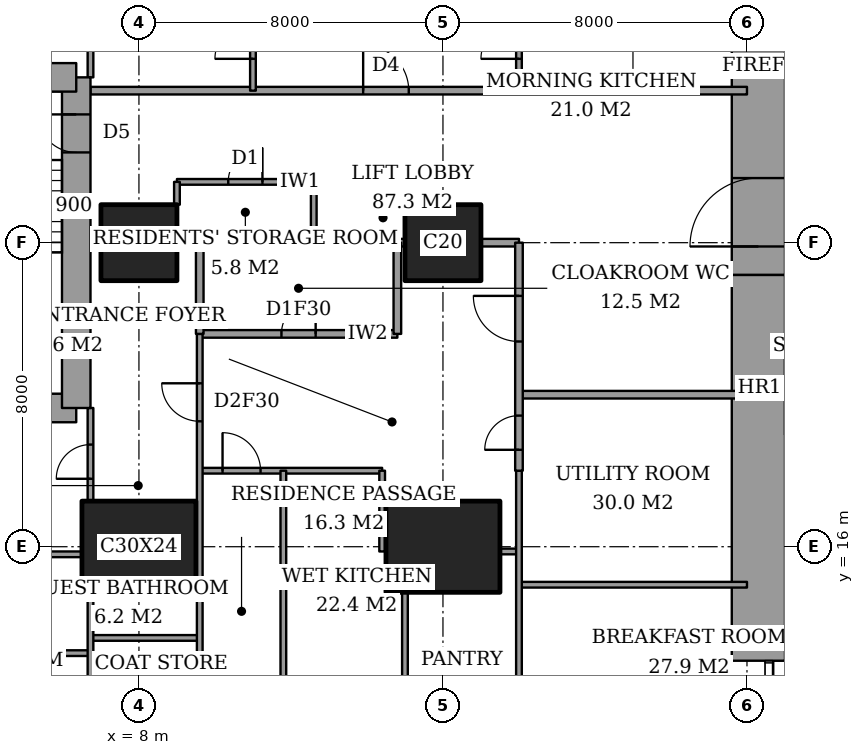
"""IFC4 building model, lengths in metres.
Left out: names, types, materials, properties, quantities, classifications, styles, units other than length and angle.
Written with IfcOpenShell. Run it as: python <this file> out.ifc"""

import sys

from ifc_helpers import new_model, si_unit, direction, frame, frame_2d, origin, origin_2d, place, context, subcontext, project, spatial, rectangle, extrude, element, fill, save


model = new_model("IFC4")
c1 = context("Model", 3, precision=1e-05, world=origin(), true_north=direction((0.0, 1.0)))
c2 = subcontext(c1, "Body", "Model", "MODEL_VIEW")
j1 = project(units=[si_unit("LENGTHUNIT", "METRE"), si_unit("PLANEANGLEUNIT", "RADIAN")], contexts=[c1])
p1 = place(None, origin())
s1 = spatial("IfcSite", under=j1, at=p1, CompositionType="ELEMENT")
p2 = place(p1, origin())
s2 = spatial("IfcBuilding", under=s1, at=p2, CompositionType="ELEMENT")
p3 = place(p2, frame((0.0, 0.0, 110.6)))
s3 = spatial("IfcBuildingStorey", under=s2, at=p3, CompositionType="ELEMENT", Elevation=110.6)
p4 = place(p3, frame((8.0, 16.0, 0.0), z_axis=(0.0, 0.0, 1.0), x_axis=(1.0, 0.0, 0.0)))
e1 = element("IfcColumn", 1, at=p4, inside=s3, PredefinedType="COLUMN", context=c2, shape_type="SweptSolid", body=[
    extrude(rectangle(XDim=3.0, YDim=2.4, at=origin_2d()), origin(), (0.0, 0.0, 1.0), 3.6),
])
p5 = place(p3, frame((8.0, 24.0, 0.0), z_axis=(0.0, 0.0, 1.0), x_axis=(1.0, 0.0, 0.0)))
e2 = element("IfcColumn", 2, at=p5, inside=s3, PredefinedType="COLUMN", context=c2, shape_type="SweptSolid", body=[
    extrude(rectangle(XDim=2.0, YDim=2.0, at=origin_2d()), origin(), (0.0, 0.0, 1.0), 3.6),
])
p6 = place(p3, frame((16.0, 16.0, 0.0), z_axis=(0.0, 0.0, 1.0), x_axis=(1.0, 0.0, 0.0)))
e3 = element("IfcColumn", 3, at=p6, inside=s3, PredefinedType="COLUMN", context=c2, shape_type="SweptSolid", body=[
    extrude(rectangle(XDim=3.0, YDim=2.4, at=origin_2d()), origin(), (0.0, 0.0, 1.0), 3.6),
])
p7 = place(p3, frame((16.0, 24.0, 0.0), z_axis=(0.0, 0.0, 1.0), x_axis=(1.0, 0.0, 0.0)))
e4 = element("IfcColumn", 4, at=p7, inside=s3, PredefinedType="COLUMN", context=c2, shape_type="SweptSolid", body=[
    extrude(rectangle(XDim=2.0, YDim=2.0, at=origin_2d()), origin(), (0.0, 0.0, 1.0), 3.6),
])
p8 = place(p3, frame((24.3, 13.0, 0.0), z_axis=(0.0, 0.0, 1.0), x_axis=(0.0, 1.0, 0.0)))
e5 = element("IfcWall", 5, at=p8, inside=s3, PredefinedType="SHEAR", context=c2, shape_type="SweptSolid", body=[
    extrude(rectangle(XDim=10.15, YDim=1.4, at=frame_2d((5.075, 0.0))), origin(), (0.0, 0.0, 1.0), 3.6),
])
p9 = place(p3, frame((24.3, 23.15, 0.0), z_axis=(0.0, 0.0, 1.0), x_axis=(0.0, 1.0, 0.0)))
e6 = element("IfcWall", 6, at=p9, inside=s3, PredefinedType="SHEAR", context=c2, shape_type="SweptSolid", body=[
    extrude(rectangle(XDim=11.85, YDim=1.4, at=frame_2d((5.925, 0.0))), origin(), (0.0, 0.0, 1.0), 3.6),
])
p10 = place(p9, frame((0.75, 0.0, 0.0)))
e7 = element("IfcOpeningElement", 7, at=p10, cuts=e6, PredefinedType="OPENING", context=c2, shape_type="SweptSolid", body=[
    extrude(rectangle(XDim=1.8, YDim=2.4, at=frame_2d((0.9, 1.2))), frame((0.0, 0.71, 0.0), z_axis=(0.0, -1.0, 0.0), x_axis=(1.0, 0.0, 0.0)), (0.0, 0.0, 1.0), 1.42),
])
p11 = place(p3, frame((1.9, 19.65, 0.0), z_axis=(0.0, 0.0, 1.0), x_axis=(1.0, 0.0, 0.0)))
e8 = element("IfcWall", 8, at=p11, inside=s3, PredefinedType="SHEAR", context=c2, shape_type="SweptSolid", body=[
    extrude(rectangle(XDim=4.45, YDim=0.75, at=frame_2d((2.225, 0.0))), origin(), (0.0, 0.0, 1.0), 3.6),
])
p12 = place(p3, frame((6.35, 19.65, 0.0), z_axis=(0.0, 0.0, 1.0), x_axis=(0.0, 1.0, 0.0)))
e9 = element("IfcWall", 9, at=p12, inside=s3, PredefinedType="SHEAR", context=c2, shape_type="SweptSolid", body=[
    extrude(rectangle(XDim=8.7, YDim=0.75, at=frame_2d((4.35, 0.0))), origin(), (0.0, 0.0, 1.0), 3.6),
])
p13 = place(p12, frame((6.725, 0.0, 0.0)))
e10 = element("IfcOpeningElement", 10, at=p13, cuts=e9, PredefinedType="OPENING", context=c2, shape_type="SweptSolid", body=[
    extrude(rectangle(XDim=1.0, YDim=2.1, at=frame_2d((0.5, 1.05))), frame((0.0, 0.385, 0.0), z_axis=(0.0, -1.0, 0.0), x_axis=(1.0, 0.0, 0.0)), (0.0, 0.0, 1.0), 0.77),
])
p14 = place(p3, frame((6.35, 28.35, 0.0), z_axis=(0.0, 0.0, 1.0), x_axis=(-1.0, 0.0, 0.0)))
e11 = element("IfcWall", 11, at=p14, inside=s3, PredefinedType="SHEAR", context=c2, shape_type="SweptSolid", body=[
    extrude(rectangle(XDim=4.45, YDim=0.75, at=frame_2d((2.225, 0.0))), origin(), (0.0, 0.0, 1.0), 3.6),
])
p15 = place(p3, frame((4.325, 13.2, 0.0), z_axis=(0.0, 0.0, 1.0), x_axis=(1.0, 0.0, 0.0)))
e12 = element("IfcWall", 12, at=p15, inside=s3, PredefinedType="PARTITIONING", context=c2, shape_type="SweptSolid", body=[
    extrude(rectangle(XDim=2.4, YDim=0.15, at=frame_2d((1.2, 0.0))), origin(), (0.0, 0.0, 1.0), 3.35),
])
p16 = place(p3, frame((6.725, 13.6, 0.0), z_axis=(0.0, 0.0, 1.0), x_axis=(1.0, 0.0, 0.0)))
e13 = element("IfcWall", 13, at=p16, inside=s3, PredefinedType="PARTITIONING", context=c2, shape_type="SweptSolid", body=[
    extrude(rectangle(XDim=2.875, YDim=0.15, at=frame_2d((1.438, 0.0))), origin(), (0.0, 0.0, 1.0), 3.35),
])
p17 = place(p3, frame((18.0, 15.0, 0.0), z_axis=(0.0, 0.0, 1.0), x_axis=(1.0, 0.0, 0.0)))
e14 = element("IfcWall", 14, at=p17, inside=s3, PredefinedType="PARTITIONING", context=c2, shape_type="SweptSolid", body=[
    extrude(rectangle(XDim=6.0, YDim=0.15, at=frame_2d((3.0, 0.0))), origin(), (0.0, 0.0, 1.0), 3.35),
])
p18 = place(p3, frame((1.35, 15.8, 0.0), z_axis=(0.0, 0.0, 1.0), x_axis=(1.0, 0.0, 0.0)))
e15 = element("IfcWall", 15, at=p18, inside=s3, PredefinedType="PARTITIONING", context=c2, shape_type="SweptSolid", body=[
    extrude(rectangle(XDim=5.15, YDim=0.15, at=frame_2d((2.575, 0.0))), origin(), (0.0, 0.0, 1.0), 3.35),
])
p19 = place(p3, frame((17.5, 15.875, 0.0), z_axis=(0.0, 0.0, 1.0), x_axis=(1.0, 0.0, 0.0)))
e16 = element("IfcWall", 16, at=p19, inside=s3, PredefinedType="PARTITIONING", context=c2, shape_type="SweptSolid", body=[
    extrude(rectangle(XDim=0.5, YDim=0.15, at=frame_2d((0.25, 0.0))), origin(), (0.0, 0.0, 1.0), 2.634),
])
p20 = place(p3, frame((9.6, 18.0, 0.0), z_axis=(0.0, 0.0, 1.0), x_axis=(1.0, 0.0, 0.0)))
e17 = element("IfcWall", 17, at=p20, inside=s3, PredefinedType="PARTITIONING", context=c2, shape_type="SweptSolid", body=[
    extrude(rectangle(XDim=4.8, YDim=0.15, at=frame_2d((2.4, 0.0))), origin(), (0.0, 0.0, 1.0), 3.35),
])
p21 = place(p20, frame((0.6, 0.0, 0.0)))
e18 = element("IfcOpeningElement", 18, at=p21, cuts=e17, PredefinedType="OPENING", context=c2, shape_type="SweptSolid", body=[
    extrude(rectangle(XDim=1.0, YDim=2.1, at=frame_2d((0.5, 1.05))), frame((0.0, 0.085, 0.0), z_axis=(0.0, -1.0, 0.0), x_axis=(1.0, 0.0, 0.0)), (0.0, 0.0, 1.0), 0.17),
])
p22 = place(p3, frame((18.0, 20.0, 0.0), z_axis=(0.0, 0.0, 1.0), x_axis=(1.0, 0.0, 0.0)))
e19 = element("IfcWall", 19, at=p22, inside=s3, PredefinedType="PARTITIONING", context=c2, shape_type="SweptSolid", body=[
    extrude(rectangle(XDim=6.0, YDim=0.2, at=frame_2d((3.0, 0.0))), origin(), (0.0, 0.0, 1.0), 3.35),
])
p23 = place(p3, frame((9.6, 21.6, 0.0), z_axis=(0.0, 0.0, 1.0), x_axis=(1.0, 0.0, 0.0)))
e20 = element("IfcWall", 20, at=p23, inside=s3, PredefinedType="PARTITIONING", context=c2, shape_type="SweptSolid", body=[
    extrude(rectangle(XDim=5.2, YDim=0.2, at=frame_2d((2.6, 0.0))), origin(), (0.0, 0.0, 1.0), 3.35),
])
p24 = place(p23, frame((2.15, 0.0, 0.0)))
e21 = element("IfcOpeningElement", 21, at=p24, cuts=e20, PredefinedType="OPENING", context=c2, shape_type="SweptSolid", body=[
    extrude(rectangle(XDim=0.9, YDim=2.1, at=frame_2d((0.45, 1.05))), frame((0.0, 0.11, 0.0), z_axis=(0.0, -1.0, 0.0), x_axis=(1.0, 0.0, 0.0)), (0.0, 0.0, 1.0), 0.22),
])
p25 = place(p3, frame((9.0, 24.0, 0.0), z_axis=(0.0, 0.0, 1.0), x_axis=(1.0, 0.0, 0.0)))
e22 = element("IfcWall", 22, at=p25, inside=s3, PredefinedType="PARTITIONING", context=c2, shape_type="SweptSolid", body=[
    extrude(rectangle(XDim=6.0, YDim=0.2, at=frame_2d((3.0, 0.0))), origin(), (0.0, 0.0, 1.0), 3.35),
])
p26 = place(p3, frame((17.0, 24.0, 0.0), z_axis=(0.0, 0.0, 1.0), x_axis=(1.0, 0.0, 0.0)))
e23 = element("IfcWall", 23, at=p26, inside=s3, PredefinedType="PARTITIONING", context=c2, shape_type="SweptSolid", body=[
    extrude(rectangle(XDim=1.0, YDim=0.2, at=frame_2d((0.5, 0.0))), origin(), (0.0, 0.0, 1.0), 3.35),
])
p27 = place(p3, frame((9.0, 25.6, 0.0), z_axis=(0.0, 0.0, 1.0), x_axis=(1.0, 0.0, 0.0)))
e24 = element("IfcWall", 24, at=p27, inside=s3, PredefinedType="PARTITIONING", context=c2, shape_type="SweptSolid", body=[
    extrude(rectangle(XDim=3.6, YDim=0.15, at=frame_2d((1.8, 0.0))), origin(), (0.0, 0.0, 1.0), 3.35),
])
p28 = place(p27, frame((1.35, 0.0, 0.0)))
e25 = element("IfcOpeningElement", 25, at=p28, cuts=e24, PredefinedType="OPENING", context=c2, shape_type="SweptSolid", body=[
    extrude(rectangle(XDim=0.9, YDim=2.1, at=frame_2d((0.45, 1.05))), frame((0.0, 0.085, 0.0), z_axis=(0.0, -1.0, 0.0), x_axis=(1.0, 0.0, 0.0)), (0.0, 0.0, 1.0), 0.17),
])
p29 = place(p3, frame((6.725, 28.0, 0.0), z_axis=(0.0, 0.0, 1.0), x_axis=(1.0, 0.0, 0.0)))
e26 = element("IfcWall", 26, at=p29, inside=s3, PredefinedType="PARTITIONING", context=c2, shape_type="SweptSolid", body=[
    extrude(rectangle(XDim=17.275, YDim=0.2, at=frame_2d((8.637, 0.0))), origin(), (0.0, 0.0, 1.0), 3.35),
])
p30 = place(p29, frame((7.175, 0.0, 0.0)))
e27 = element("IfcOpeningElement", 27, at=p30, cuts=e26, PredefinedType="OPENING", context=c2, shape_type="SweptSolid", body=[
    extrude(rectangle(XDim=1.2, YDim=2.4, at=frame_2d((0.6, 1.2))), frame((0.0, 0.11, 0.0), z_axis=(0.0, -1.0, 0.0), x_axis=(1.0, 0.0, 0.0)), (0.0, 0.0, 1.0), 0.22),
])
p31 = place(p3, frame((6.725, 10.6, 0.0), z_axis=(0.0, 0.0, 1.0), x_axis=(0.0, 1.0, 0.0)))
e28 = element("IfcWall", 28, at=p31, inside=s3, PredefinedType="PARTITIONING", context=c2, shape_type="SweptSolid", body=[
    extrude(rectangle(XDim=4.2, YDim=0.15, at=frame_2d((2.1, 0.0))), origin(), (0.0, 0.0, 1.0), 3.35),
])
p32 = place(p3, frame((6.725, 17.2, 0.0), z_axis=(0.0, 0.0, 1.0), x_axis=(0.0, 1.0, 0.0)))
e29 = element("IfcWall", 29, at=p32, inside=s3, PredefinedType="PARTITIONING", context=c2, shape_type="SweptSolid", body=[
    extrude(rectangle(XDim=2.45, YDim=0.15, at=frame_2d((1.225, 0.0))), origin(), (0.0, 0.0, 1.0), 3.35),
])
p33 = place(p32, frame((0.587, 0.0, 0.0)))
e30 = element("IfcOpeningElement", 30, at=p33, cuts=e29, PredefinedType="OPENING", context=c2, shape_type="SweptSolid", body=[
    extrude(rectangle(XDim=0.9, YDim=2.1, at=frame_2d((0.45, 1.05))), frame((0.0, 0.085, 0.0), z_axis=(0.0, -1.0, 0.0), x_axis=(1.0, 0.0, 0.0)), (0.0, 0.0, 1.0), 0.17),
])
p34 = place(p3, frame((6.725, 28.35, 0.0), z_axis=(0.0, 0.0, 1.0), x_axis=(0.0, 1.0, 0.0)))
e31 = element("IfcWall", 31, at=p34, inside=s3, PredefinedType="PARTITIONING", context=c2, shape_type="SweptSolid", body=[
    extrude(rectangle(XDim=2.45, YDim=0.15, at=frame_2d((1.225, 0.0))), origin(), (0.0, 0.0, 1.0), 3.35),
])
p35 = place(p34, frame((0.913, 0.0, 0.0)))
e32 = element("IfcOpeningElement", 32, at=p35, cuts=e31, PredefinedType="OPENING", context=c2, shape_type="SweptSolid", body=[
    extrude(rectangle(XDim=1.0, YDim=2.1, at=frame_2d((0.5, 1.05))), frame((0.0, 0.085, 0.0), z_axis=(0.0, -1.0, 0.0), x_axis=(1.0, 0.0, 0.0)), (0.0, 0.0, 1.0), 0.17),
])
p36 = place(p3, frame((9.0, 25.0, 0.0), z_axis=(0.0, 0.0, 1.0), x_axis=(0.0, 1.0, 0.0)))
e33 = element("IfcWall", 33, at=p36, inside=s3, PredefinedType="PARTITIONING", context=c2, shape_type="SweptSolid", body=[
    extrude(rectangle(XDim=0.6, YDim=0.15, at=frame_2d((0.3, 0.0))), origin(), (0.0, 0.0, 1.0), 3.35),
])
p37 = place(p3, frame((9.6, 21.6, 0.0), z_axis=(0.0, 0.0, 1.0), x_axis=(0.0, 1.0, 0.0)))
e34 = element("IfcWall", 34, at=p37, inside=s3, PredefinedType="PARTITIONING", context=c2, shape_type="SweptSolid", body=[
    extrude(rectangle(XDim=2.4, YDim=0.2, at=frame_2d((1.2, 0.0))), origin(), (0.0, 0.0, 1.0), 3.35),
])
p38 = place(p3, frame((9.6, 10.6, 0.0), z_axis=(0.0, 0.0, 1.0), x_axis=(0.0, 1.0, 0.0)))
e35 = element("IfcWall", 35, at=p38, inside=s3, PredefinedType="PARTITIONING", context=c2, shape_type="SweptSolid", body=[
    extrude(rectangle(XDim=11.0, YDim=0.15, at=frame_2d((5.5, 0.0))), origin(), (0.0, 0.0, 1.0), 3.35),
])
p39 = place(p38, frame((8.7, 0.0, 0.0)))
e36 = element("IfcOpeningElement", 36, at=p39, cuts=e35, PredefinedType="OPENING", context=c2, shape_type="SweptSolid", body=[
    extrude(rectangle(XDim=1.0, YDim=2.1, at=frame_2d((0.5, 1.05))), frame((0.0, 0.085, 0.0), z_axis=(0.0, -1.0, 0.0), x_axis=(1.0, 0.0, 0.0)), (0.0, 0.0, 1.0), 0.17),
])
p40 = place(p3, frame((11.0, 28.0, 0.0), z_axis=(0.0, 0.0, 1.0), x_axis=(0.0, 1.0, 0.0)))
e37 = element("IfcWall", 37, at=p40, inside=s3, PredefinedType="PARTITIONING", context=c2, shape_type="SweptSolid", body=[
    extrude(rectangle(XDim=9.2, YDim=0.15, at=frame_2d((4.6, 0.0))), origin(), (0.0, 0.0, 1.0), 3.35),
])
p41 = place(p40, frame((0.837, 0.0, 0.0)))
e38 = element("IfcOpeningElement", 38, at=p41, cuts=e37, PredefinedType="OPENING", context=c2, shape_type="SweptSolid", body=[
    extrude(rectangle(XDim=1.0, YDim=2.1, at=frame_2d((0.5, 1.05))), frame((0.0, 0.085, 0.0), z_axis=(0.0, -1.0, 0.0), x_axis=(1.0, 0.0, 0.0)), (0.0, 0.0, 1.0), 0.17),
])
p42 = place(p3, frame((11.8, 10.6, 0.0), z_axis=(0.0, 0.0, 1.0), x_axis=(0.0, 1.0, 0.0)))
e39 = element("IfcWall", 39, at=p42, inside=s3, PredefinedType="PARTITIONING", context=c2, shape_type="SweptSolid", body=[
    extrude(rectangle(XDim=7.4, YDim=0.15, at=frame_2d((3.7, 0.0))), origin(), (0.0, 0.0, 1.0), 3.35),
])
p43 = place(p3, frame((12.6, 24.0, 0.0), z_axis=(0.0, 0.0, 1.0), x_axis=(0.0, 1.0, 0.0)))
e40 = element("IfcWall", 40, at=p43, inside=s3, PredefinedType="PARTITIONING", context=c2, shape_type="SweptSolid", body=[
    extrude(rectangle(XDim=1.6, YDim=0.15, at=frame_2d((0.8, 0.0))), origin(), (0.0, 0.0, 1.0), 3.35),
])
p44 = place(p3, frame((14.4, 15.875, 0.0), z_axis=(0.0, 0.0, 1.0), x_axis=(0.0, 1.0, 0.0)))
e41 = element("IfcWall", 41, at=p44, inside=s3, PredefinedType="PARTITIONING", context=c2, shape_type="SweptSolid", body=[
    extrude(rectangle(XDim=2.125, YDim=0.15, at=frame_2d((1.062, 0.0))), origin(), (0.0, 0.0, 1.0), 3.35),
])
p45 = place(p3, frame((14.8, 21.6, 0.0), z_axis=(0.0, 0.0, 1.0), x_axis=(0.0, 1.0, 0.0)))
e42 = element("IfcWall", 42, at=p45, inside=s3, PredefinedType="PARTITIONING", context=c2, shape_type="SweptSolid", body=[
    extrude(rectangle(XDim=2.4, YDim=0.2, at=frame_2d((1.2, 0.0))), origin(), (0.0, 0.0, 1.0), 3.35),
])
p46 = place(p3, frame((15.0, 10.6, 0.0), z_axis=(0.0, 0.0, 1.0), x_axis=(0.0, 1.0, 0.0)))
e43 = element("IfcWall", 43, at=p46, inside=s3, PredefinedType="PARTITIONING", context=c2, shape_type="SweptSolid", body=[
    extrude(rectangle(XDim=4.2, YDim=0.15, at=frame_2d((2.1, 0.0))), origin(), (0.0, 0.0, 1.0), 3.35),
])
p47 = place(p3, frame((18.0, 18.0, 0.0), z_axis=(0.0, 0.0, 1.0), x_axis=(0.0, 1.0, 0.0)))
e44 = element("IfcWall", 44, at=p47, inside=s3, PredefinedType="PARTITIONING", context=c2, shape_type="SweptSolid", body=[
    extrude(rectangle(XDim=6.0, YDim=0.2, at=frame_2d((3.0, 0.0))), origin(), (0.0, 0.0, 1.0), 3.35),
])
p48 = place(p47, frame((3.4, 0.0, 0.0)))
e45 = element("IfcOpeningElement", 45, at=p48, cuts=e44, PredefinedType="OPENING", context=c2, shape_type="SweptSolid", body=[
    extrude(rectangle(XDim=1.2, YDim=2.4, at=frame_2d((0.6, 1.2))), frame((0.0, 0.11, 0.0), z_axis=(0.0, -1.0, 0.0), x_axis=(1.0, 0.0, 0.0)), (0.0, 0.0, 1.0), 0.22),
])
p49 = place(p47, frame((0.55, 0.0, 0.0)))
e46 = element("IfcOpeningElement", 46, at=p49, cuts=e44, PredefinedType="OPENING", context=c2, shape_type="SweptSolid", body=[
    extrude(rectangle(XDim=0.9, YDim=2.1, at=frame_2d((0.45, 1.05))), frame((0.0, 0.11, 0.0), z_axis=(0.0, -1.0, 0.0), x_axis=(1.0, 0.0, 0.0)), (0.0, 0.0, 1.0), 0.22),
])
p50 = place(p3, frame((18.0, 10.6, 0.0), z_axis=(0.0, 0.0, 1.0), x_axis=(0.0, 1.0, 0.0)))
e47 = element("IfcWall", 47, at=p50, inside=s3, PredefinedType="PARTITIONING", context=c2, shape_type="SweptSolid", body=[
    extrude(rectangle(XDim=7.4, YDim=0.15, at=frame_2d((3.7, 0.0))), origin(), (0.0, 0.0, 1.0), 3.35),
])
p51 = place(p3, frame((18.0, 28.0, 0.0), z_axis=(0.0, 0.0, 1.0), x_axis=(0.0, 1.0, 0.0)))
e48 = element("IfcWall", 48, at=p51, inside=s3, PredefinedType="PARTITIONING", context=c2, shape_type="SweptSolid", body=[
    extrude(rectangle(XDim=9.2, YDim=0.15, at=frame_2d((4.6, 0.0))), origin(), (0.0, 0.0, 1.0), 3.35),
])
p52 = place(p51, frame((0.837, 0.0, 0.0)))
e49 = element("IfcOpeningElement", 49, at=p52, cuts=e48, PredefinedType="OPENING", context=c2, shape_type="SweptSolid", body=[
    extrude(rectangle(XDim=1.0, YDim=2.1, at=frame_2d((0.5, 1.05))), frame((0.0, 0.085, 0.0), z_axis=(0.0, -1.0, 0.0), x_axis=(1.0, 0.0, 0.0)), (0.0, 0.0, 1.0), 0.17),
])
p53 = place(p33, origin())
e50 = element("IfcDoor", 50, at=p53, inside=s3, OperationType="SINGLE_SWING_RIGHT", PredefinedType="DOOR", context=c2, shape_type="SweptSolid", body=[
    extrude(rectangle(XDim=0.9, YDim=2.1, at=frame_2d((0.45, 1.05))), frame((0.0, 0.025, 0.0), z_axis=(0.0, -1.0, 0.0), x_axis=(1.0, 0.0, 0.0)), (0.0, 0.0, 1.0), 0.05),
])
fill(e30, e50)
p54 = place(p39, origin())
e51 = element("IfcDoor", 51, at=p54, inside=s3, OperationType="SINGLE_SWING_LEFT", PredefinedType="DOOR", context=c2, shape_type="SweptSolid", body=[
    extrude(rectangle(XDim=1.0, YDim=2.1, at=frame_2d((0.5, 1.05))), frame((0.0, 0.025, 0.0), z_axis=(0.0, -1.0, 0.0), x_axis=(1.0, 0.0, 0.0)), (0.0, 0.0, 1.0), 0.05),
])
fill(e36, e51)
p55 = place(p24, origin())
e52 = element("IfcDoor", 52, at=p55, inside=s3, OperationType="SINGLE_SWING_LEFT", PredefinedType="DOOR", context=c2, shape_type="SweptSolid", body=[
    extrude(rectangle(XDim=0.9, YDim=2.1, at=frame_2d((0.45, 1.05))), frame((0.0, 0.025, 0.0), z_axis=(0.0, -1.0, 0.0), x_axis=(1.0, 0.0, 0.0)), (0.0, 0.0, 1.0), 0.05),
])
fill(e21, e52)
p56 = place(p48, origin())
e53 = element("IfcDoor", 53, at=p56, inside=s3, OperationType="SINGLE_SWING_LEFT", PredefinedType="DOOR", context=c2, shape_type="SweptSolid", body=[
    extrude(rectangle(XDim=1.2, YDim=2.4, at=frame_2d((0.6, 1.2))), frame((0.0, 0.025, 0.0), z_axis=(0.0, -1.0, 0.0), x_axis=(1.0, 0.0, 0.0)), (0.0, 0.0, 1.0), 0.05),
])
fill(e45, e53)
p57 = place(p21, origin())
e54 = element("IfcDoor", 54, at=p57, inside=s3, OperationType="SINGLE_SWING_RIGHT", PredefinedType="DOOR", context=c2, shape_type="SweptSolid", body=[
    extrude(rectangle(XDim=1.0, YDim=2.1, at=frame_2d((0.5, 1.05))), frame((0.0, 0.025, 0.0), z_axis=(0.0, -1.0, 0.0), x_axis=(1.0, 0.0, 0.0)), (0.0, 0.0, 1.0), 0.05),
])
fill(e18, e54)
p58 = place(p49, origin())
e55 = element("IfcDoor", 55, at=p58, inside=s3, OperationType="SINGLE_SWING_RIGHT", PredefinedType="DOOR", context=c2, shape_type="SweptSolid", body=[
    extrude(rectangle(XDim=0.9, YDim=2.1, at=frame_2d((0.45, 1.05))), frame((0.0, 0.025, 0.0), z_axis=(0.0, -1.0, 0.0), x_axis=(1.0, 0.0, 0.0)), (0.0, 0.0, 1.0), 0.05),
])
fill(e46, e55)
p59 = place(p41, origin())
e56 = element("IfcDoor", 56, at=p59, inside=s3, OperationType="SINGLE_SWING_RIGHT", PredefinedType="DOOR", context=c2, shape_type="SweptSolid", body=[
    extrude(rectangle(XDim=1.0, YDim=2.1, at=frame_2d((0.5, 1.05))), frame((0.0, 0.025, 0.0), z_axis=(0.0, -1.0, 0.0), x_axis=(1.0, 0.0, 0.0)), (0.0, 0.0, 1.0), 0.05),
])
fill(e38, e56)
p60 = place(p30, origin())
e57 = element("IfcDoor", 57, at=p60, inside=s3, OperationType="SINGLE_SWING_RIGHT", PredefinedType="DOOR", context=c2, shape_type="SweptSolid", body=[
    extrude(rectangle(XDim=1.2, YDim=2.4, at=frame_2d((0.6, 1.2))), frame((0.0, 0.025, 0.0), z_axis=(0.0, -1.0, 0.0), x_axis=(1.0, 0.0, 0.0)), (0.0, 0.0, 1.0), 0.05),
])
fill(e27, e57)
p61 = place(p52, origin())
e58 = element("IfcDoor", 58, at=p61, inside=s3, OperationType="SINGLE_SWING_RIGHT", PredefinedType="DOOR", context=c2, shape_type="SweptSolid", body=[
    extrude(rectangle(XDim=1.0, YDim=2.1, at=frame_2d((0.5, 1.05))), frame((0.0, 0.025, 0.0), z_axis=(0.0, -1.0, 0.0), x_axis=(1.0, 0.0, 0.0)), (0.0, 0.0, 1.0), 0.05),
])
fill(e49, e58)
p62 = place(p28, origin())
e59 = element("IfcDoor", 59, at=p62, inside=s3, OperationType="SINGLE_SWING_LEFT", PredefinedType="DOOR", context=c2, shape_type="SweptSolid", body=[
    extrude(rectangle(XDim=0.9, YDim=2.1, at=frame_2d((0.45, 1.05))), frame((0.0, 0.025, 0.0), z_axis=(0.0, -1.0, 0.0), x_axis=(1.0, 0.0, 0.0)), (0.0, 0.0, 1.0), 0.05),
])
fill(e25, e59)
p63 = place(p10, origin())
e60 = element("IfcDoor", 60, at=p63, inside=s3, OperationType="DOUBLE_DOOR_DOUBLE_SWING", PredefinedType="DOOR", context=c2, shape_type="SweptSolid", body=[
    extrude(rectangle(XDim=1.8, YDim=2.4, at=frame_2d((0.9, 1.2))), frame((0.0, 0.025, 0.0), z_axis=(0.0, -1.0, 0.0), x_axis=(1.0, 0.0, 0.0)), (0.0, 0.0, 1.0), 0.05),
])
fill(e7, e60)
p64 = place(p13, origin())
e61 = element("IfcDoor", 61, at=p64, inside=s3, OperationType="SINGLE_SWING_LEFT", PredefinedType="DOOR", context=c2, shape_type="SweptSolid", body=[
    extrude(rectangle(XDim=1.0, YDim=2.1, at=frame_2d((0.5, 1.05))), frame((0.0, 0.025, 0.0), z_axis=(0.0, -1.0, 0.0), x_axis=(1.0, 0.0, 0.0)), (0.0, 0.0, 1.0), 0.05),
])
fill(e10, e61)
save(model, sys.argv[1])
